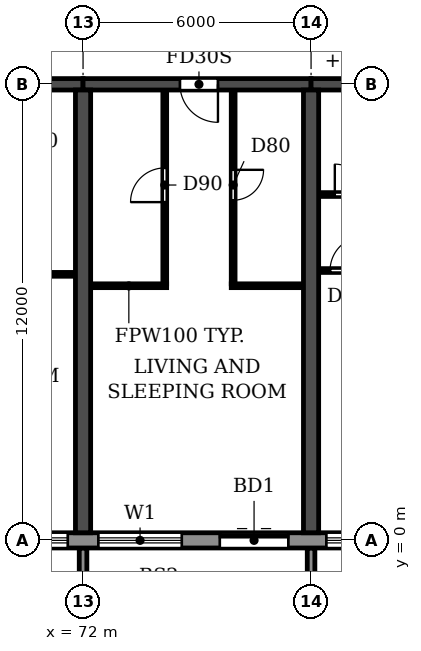
"""IFC4 building model, lengths in metres.
Left out: names, types, materials, properties, quantities, classifications, styles, units other than length and angle.
Written with IfcOpenShell. Run it as: python <this file> out.ifc"""

import sys

from ifc_helpers import new_model, si_unit, direction, frame, frame_2d, origin, place, context, subcontext, project, spatial, polyline, rectangle, outline, extrude, source, transform, mapped, element, fill, save


model = new_model("IFC4")
c1 = context("Model", 3, precision=1e-05, world=origin(), true_north=direction((0.0, 1.0)))
c2 = subcontext(c1, "Body", "Model", "MODEL_VIEW")
j1 = project(units=[si_unit("LENGTHUNIT", "METRE"), si_unit("PLANEANGLEUNIT", "RADIAN")], contexts=[c1])
p1 = place(None, origin())
s1 = spatial("IfcSite", under=j1, at=p1, CompositionType="ELEMENT")
p2 = place(p1, origin())
s2 = spatial("IfcBuilding", under=s1, at=p2, CompositionType="ELEMENT")
p3 = place(p2, frame((0.0, 0.0, 26.7)))
s3 = spatial("IfcBuildingStorey", under=s2, at=p3, CompositionType="ELEMENT", Elevation=26.7)
for number, where, z_axis, x_axis in (
    (1, (72.0, 0.2, 0.0), (0.0, 0.0, 1.0), (0.0, 1.0, 0.0)),
    (2, (78.0, 0.2, 0.0), (0.0, 0.0, 1.0), (0.0, 1.0, 0.0)),
):
    element("IfcWall", number, at=place(p3, frame(where, z_axis=z_axis, x_axis=x_axis)), inside=s3, PredefinedType="SHEAR", context=c2, shape_type="SweptSolid", body=[
        extrude(rectangle(XDim=11.65, YDim=0.4, at=frame_2d((5.825, 0.0))), origin(), (0.0, 0.0, 1.0), 3.05),
    ])
p4 = place(p3, frame((66.0, 12.0, 0.0), z_axis=(0.0, 0.0, 1.0), x_axis=(1.0, 0.0, 0.0)))
e3 = element("IfcWall", 3, at=p4, inside=s3, PredefinedType="SHEAR", context=c2, shape_type="SweptSolid", body=[
    extrude(rectangle(XDim=6.0, YDim=0.3, at=frame_2d((3.0, 0.0))), origin(), (0.0, 0.0, 1.0), 2.45),
])
p5 = place(p4, frame((2.45, 0.0, 0.0)))
e4 = element("IfcOpeningElement", 4, at=p5, cuts=e3, PredefinedType="OPENING", context=c2, shape_type="SweptSolid", body=[
    extrude(rectangle(XDim=1.0, YDim=2.1, at=frame_2d((0.5, 1.05))), frame((0.0, 0.16, 0.0), z_axis=(0.0, -1.0, 0.0), x_axis=(1.0, 0.0, 0.0)), (0.0, 0.0, 1.0), 0.32),
])
p6 = place(p3, frame((72.0, 12.0, 0.0), z_axis=(0.0, 0.0, 1.0), x_axis=(1.0, 0.0, 0.0)))
e5 = element("IfcWall", 5, at=p6, inside=s3, PredefinedType="SHEAR", context=c2, shape_type="SweptSolid", body=[
    extrude(rectangle(XDim=6.0, YDim=0.3, at=frame_2d((3.0, 0.0))), origin(), (0.0, 0.0, 1.0), 2.45),
])
p7 = place(p6, frame((2.55, 0.0, 0.0)))
e6 = element("IfcOpeningElement", 6, at=p7, cuts=e5, PredefinedType="OPENING", context=c2, shape_type="SweptSolid", body=[
    extrude(rectangle(XDim=1.0, YDim=2.1, at=frame_2d((0.5, 1.05))), frame((0.0, 0.16, 0.0), z_axis=(0.0, -1.0, 0.0), x_axis=(1.0, 0.0, 0.0)), (0.0, 0.0, 1.0), 0.32),
])
p8 = place(p3, frame((78.0, 12.0, 0.0), z_axis=(0.0, 0.0, 1.0), x_axis=(1.0, 0.0, 0.0)))
e7 = element("IfcWall", 7, at=p8, inside=s3, PredefinedType="SHEAR", context=c2, shape_type="SweptSolid", body=[
    extrude(rectangle(XDim=6.0, YDim=0.3, at=frame_2d((3.0, 0.0))), origin(), (0.0, 0.0, 1.0), 2.45),
])
p9 = place(p8, frame((2.45, 0.0, 0.0)))
e8 = element("IfcOpeningElement", 8, at=p9, cuts=e7, PredefinedType="OPENING", context=c2, shape_type="SweptSolid", body=[
    extrude(rectangle(XDim=1.0, YDim=2.1, at=frame_2d((0.5, 1.05))), frame((0.0, 0.16, 0.0), z_axis=(0.0, -1.0, 0.0), x_axis=(1.0, 0.0, 0.0)), (0.0, 0.0, 1.0), 0.32),
])
p10 = place(p3, frame((4.683, 0.0, 0.0), z_axis=(0.0, 0.0, 1.0), x_axis=(1.0, 0.0, 0.0)))
e9 = element("IfcWall", 9, at=p10, inside=s3, PredefinedType="STANDARD", context=c2, shape_type="SweptSolid", body=[
    extrude(rectangle(XDim=92.634, YDim=0.4, at=frame_2d((46.317, 0.0))), origin(), (0.0, 0.0, 1.0), 3.05),
])
p11 = place(p10, frame((1.717, 0.0, 0.9)))
e10 = element("IfcOpeningElement", 10, at=p11, cuts=e9, PredefinedType="OPENING", context=c2, shape_type="SweptSolid", body=[
    extrude(rectangle(XDim=2.2, YDim=1.5, at=frame_2d((1.1, 0.75))), frame((0.0, 0.21, 0.0), z_axis=(0.0, -1.0, 0.0), x_axis=(1.0, 0.0, 0.0)), (0.0, 0.0, 1.0), 0.42),
])
p12 = place(p10, frame((4.717, 0.0, 0.9)))
e11 = element("IfcOpeningElement", 11, at=p12, cuts=e9, PredefinedType="OPENING", context=c2, shape_type="SweptSolid", body=[
    extrude(rectangle(XDim=2.2, YDim=1.5, at=frame_2d((1.1, 0.75))), frame((0.0, 0.21, 0.0), z_axis=(0.0, -1.0, 0.0), x_axis=(1.0, 0.0, 0.0)), (0.0, 0.0, 1.0), 0.42),
])
p13 = place(p10, frame((7.717, 0.0, 0.9)))
e12 = element("IfcOpeningElement", 12, at=p13, cuts=e9, PredefinedType="OPENING", context=c2, shape_type="SweptSolid", body=[
    extrude(rectangle(XDim=2.2, YDim=1.5, at=frame_2d((1.1, 0.75))), frame((0.0, 0.21, 0.0), z_axis=(0.0, -1.0, 0.0), x_axis=(1.0, 0.0, 0.0)), (0.0, 0.0, 1.0), 0.42),
])
p14 = place(p10, frame((10.717, 0.0, 0.9)))
e13 = element("IfcOpeningElement", 13, at=p14, cuts=e9, PredefinedType="OPENING", context=c2, shape_type="SweptSolid", body=[
    extrude(rectangle(XDim=2.2, YDim=1.5, at=frame_2d((1.1, 0.75))), frame((0.0, 0.21, 0.0), z_axis=(0.0, -1.0, 0.0), x_axis=(1.0, 0.0, 0.0)), (0.0, 0.0, 1.0), 0.42),
])
p15 = place(p10, frame((13.717, 0.0, 0.9)))
e14 = element("IfcOpeningElement", 14, at=p15, cuts=e9, PredefinedType="OPENING", context=c2, shape_type="SweptSolid", body=[
    extrude(rectangle(XDim=2.2, YDim=1.5, at=frame_2d((1.1, 0.75))), frame((0.0, 0.21, 0.0), z_axis=(0.0, -1.0, 0.0), x_axis=(1.0, 0.0, 0.0)), (0.0, 0.0, 1.0), 0.42),
])
p16 = place(p10, frame((16.717, 0.0, 0.9)))
e15 = element("IfcOpeningElement", 15, at=p16, cuts=e9, PredefinedType="OPENING", context=c2, shape_type="SweptSolid", body=[
    extrude(rectangle(XDim=2.2, YDim=1.5, at=frame_2d((1.1, 0.75))), frame((0.0, 0.21, 0.0), z_axis=(0.0, -1.0, 0.0), x_axis=(1.0, 0.0, 0.0)), (0.0, 0.0, 1.0), 0.42),
])
p17 = place(p10, frame((19.917, 0.0, 0.0)))
e16 = element("IfcOpeningElement", 16, at=p17, cuts=e9, PredefinedType="OPENING", context=c2, shape_type="SweptSolid", body=[
    extrude(rectangle(XDim=1.8, YDim=2.4, at=frame_2d((0.9, 1.2))), frame((0.0, 0.21, 0.0), z_axis=(0.0, -1.0, 0.0), x_axis=(1.0, 0.0, 0.0)), (0.0, 0.0, 1.0), 0.42),
])
p18 = place(p10, frame((22.717, 0.0, 0.9)))
e17 = element("IfcOpeningElement", 17, at=p18, cuts=e9, PredefinedType="OPENING", context=c2, shape_type="SweptSolid", body=[
    extrude(rectangle(XDim=2.2, YDim=1.5, at=frame_2d((1.1, 0.75))), frame((0.0, 0.21, 0.0), z_axis=(0.0, -1.0, 0.0), x_axis=(1.0, 0.0, 0.0)), (0.0, 0.0, 1.0), 0.42),
])
p19 = place(p10, frame((25.717, 0.0, 0.9)))
e18 = element("IfcOpeningElement", 18, at=p19, cuts=e9, PredefinedType="OPENING", context=c2, shape_type="SweptSolid", body=[
    extrude(rectangle(XDim=2.2, YDim=1.5, at=frame_2d((1.1, 0.75))), frame((0.0, 0.21, 0.0), z_axis=(0.0, -1.0, 0.0), x_axis=(1.0, 0.0, 0.0)), (0.0, 0.0, 1.0), 0.42),
])
p20 = place(p10, frame((28.717, 0.0, 0.9)))
e19 = element("IfcOpeningElement", 19, at=p20, cuts=e9, PredefinedType="OPENING", context=c2, shape_type="SweptSolid", body=[
    extrude(rectangle(XDim=2.2, YDim=1.5, at=frame_2d((1.1, 0.75))), frame((0.0, 0.21, 0.0), z_axis=(0.0, -1.0, 0.0), x_axis=(1.0, 0.0, 0.0)), (0.0, 0.0, 1.0), 0.42),
])
p21 = place(p10, frame((31.917, 0.0, 0.0)))
e20 = element("IfcOpeningElement", 20, at=p21, cuts=e9, PredefinedType="OPENING", context=c2, shape_type="SweptSolid", body=[
    extrude(rectangle(XDim=1.8, YDim=2.4, at=frame_2d((0.9, 1.2))), frame((0.0, 0.21, 0.0), z_axis=(0.0, -1.0, 0.0), x_axis=(1.0, 0.0, 0.0)), (0.0, 0.0, 1.0), 0.42),
])
p22 = place(p10, frame((34.717, 0.0, 0.9)))
e21 = element("IfcOpeningElement", 21, at=p22, cuts=e9, PredefinedType="OPENING", context=c2, shape_type="SweptSolid", body=[
    extrude(rectangle(XDim=2.2, YDim=1.5, at=frame_2d((1.1, 0.75))), frame((0.0, 0.21, 0.0), z_axis=(0.0, -1.0, 0.0), x_axis=(1.0, 0.0, 0.0)), (0.0, 0.0, 1.0), 0.42),
])
p23 = place(p10, frame((37.717, 0.0, 0.9)))
e22 = element("IfcOpeningElement", 22, at=p23, cuts=e9, PredefinedType="OPENING", context=c2, shape_type="SweptSolid", body=[
    extrude(rectangle(XDim=2.2, YDim=1.5, at=frame_2d((1.1, 0.75))), frame((0.0, 0.21, 0.0), z_axis=(0.0, -1.0, 0.0), x_axis=(1.0, 0.0, 0.0)), (0.0, 0.0, 1.0), 0.42),
])
p24 = place(p10, frame((40.717, 0.0, 0.9)))
e23 = element("IfcOpeningElement", 23, at=p24, cuts=e9, PredefinedType="OPENING", context=c2, shape_type="SweptSolid", body=[
    extrude(rectangle(XDim=2.2, YDim=1.5, at=frame_2d((1.1, 0.75))), frame((0.0, 0.21, 0.0), z_axis=(0.0, -1.0, 0.0), x_axis=(1.0, 0.0, 0.0)), (0.0, 0.0, 1.0), 0.42),
])
p25 = place(p10, frame((43.917, 0.0, 0.0)))
e24 = element("IfcOpeningElement", 24, at=p25, cuts=e9, PredefinedType="OPENING", context=c2, shape_type="SweptSolid", body=[
    extrude(rectangle(XDim=1.8, YDim=2.4, at=frame_2d((0.9, 1.2))), frame((0.0, 0.21, 0.0), z_axis=(0.0, -1.0, 0.0), x_axis=(1.0, 0.0, 0.0)), (0.0, 0.0, 1.0), 0.42),
])
p26 = place(p10, frame((46.717, 0.0, 0.9)))
e25 = element("IfcOpeningElement", 25, at=p26, cuts=e9, PredefinedType="OPENING", context=c2, shape_type="SweptSolid", body=[
    extrude(rectangle(XDim=2.2, YDim=1.5, at=frame_2d((1.1, 0.75))), frame((0.0, 0.21, 0.0), z_axis=(0.0, -1.0, 0.0), x_axis=(1.0, 0.0, 0.0)), (0.0, 0.0, 1.0), 0.42),
])
p27 = place(p10, frame((49.717, 0.0, 0.9)))
e26 = element("IfcOpeningElement", 26, at=p27, cuts=e9, PredefinedType="OPENING", context=c2, shape_type="SweptSolid", body=[
    extrude(rectangle(XDim=2.2, YDim=1.5, at=frame_2d((1.1, 0.75))), frame((0.0, 0.21, 0.0), z_axis=(0.0, -1.0, 0.0), x_axis=(1.0, 0.0, 0.0)), (0.0, 0.0, 1.0), 0.42),
])
p28 = place(p10, frame((52.717, 0.0, 0.9)))
e27 = element("IfcOpeningElement", 27, at=p28, cuts=e9, PredefinedType="OPENING", context=c2, shape_type="SweptSolid", body=[
    extrude(rectangle(XDim=2.2, YDim=1.5, at=frame_2d((1.1, 0.75))), frame((0.0, 0.21, 0.0), z_axis=(0.0, -1.0, 0.0), x_axis=(1.0, 0.0, 0.0)), (0.0, 0.0, 1.0), 0.42),
])
p29 = place(p10, frame((55.717, 0.0, 0.9)))
e28 = element("IfcOpeningElement", 28, at=p29, cuts=e9, PredefinedType="OPENING", context=c2, shape_type="SweptSolid", body=[
    extrude(rectangle(XDim=2.2, YDim=1.5, at=frame_2d((1.1, 0.75))), frame((0.0, 0.21, 0.0), z_axis=(0.0, -1.0, 0.0), x_axis=(1.0, 0.0, 0.0)), (0.0, 0.0, 1.0), 0.42),
])
p30 = place(p10, frame((58.917, 0.0, 0.0)))
e29 = element("IfcOpeningElement", 29, at=p30, cuts=e9, PredefinedType="OPENING", context=c2, shape_type="SweptSolid", body=[
    extrude(rectangle(XDim=1.8, YDim=2.4, at=frame_2d((0.9, 1.2))), frame((0.0, 0.21, 0.0), z_axis=(0.0, -1.0, 0.0), x_axis=(1.0, 0.0, 0.0)), (0.0, 0.0, 1.0), 0.42),
])
p31 = place(p10, frame((61.717, 0.0, 0.9)))
e30 = element("IfcOpeningElement", 30, at=p31, cuts=e9, PredefinedType="OPENING", context=c2, shape_type="SweptSolid", body=[
    extrude(rectangle(XDim=2.2, YDim=1.5, at=frame_2d((1.1, 0.75))), frame((0.0, 0.21, 0.0), z_axis=(0.0, -1.0, 0.0), x_axis=(1.0, 0.0, 0.0)), (0.0, 0.0, 1.0), 0.42),
])
p32 = place(p10, frame((64.717, 0.0, 0.9)))
e31 = element("IfcOpeningElement", 31, at=p32, cuts=e9, PredefinedType="OPENING", context=c2, shape_type="SweptSolid", body=[
    extrude(rectangle(XDim=2.2, YDim=1.5, at=frame_2d((1.1, 0.75))), frame((0.0, 0.21, 0.0), z_axis=(0.0, -1.0, 0.0), x_axis=(1.0, 0.0, 0.0)), (0.0, 0.0, 1.0), 0.42),
])
p33 = place(p10, frame((67.717, 0.0, 0.9)))
e32 = element("IfcOpeningElement", 32, at=p33, cuts=e9, PredefinedType="OPENING", context=c2, shape_type="SweptSolid", body=[
    extrude(rectangle(XDim=2.2, YDim=1.5, at=frame_2d((1.1, 0.75))), frame((0.0, 0.21, 0.0), z_axis=(0.0, -1.0, 0.0), x_axis=(1.0, 0.0, 0.0)), (0.0, 0.0, 1.0), 0.42),
])
p34 = place(p10, frame((70.917, 0.0, 0.0)))
e33 = element("IfcOpeningElement", 33, at=p34, cuts=e9, PredefinedType="OPENING", context=c2, shape_type="SweptSolid", body=[
    extrude(rectangle(XDim=1.8, YDim=2.4, at=frame_2d((0.9, 1.2))), frame((0.0, 0.21, 0.0), z_axis=(0.0, -1.0, 0.0), x_axis=(1.0, 0.0, 0.0)), (0.0, 0.0, 1.0), 0.42),
])
p35 = place(p10, frame((73.717, 0.0, 0.9)))
e34 = element("IfcOpeningElement", 34, at=p35, cuts=e9, PredefinedType="OPENING", context=c2, shape_type="SweptSolid", body=[
    extrude(rectangle(XDim=2.2, YDim=1.5, at=frame_2d((1.1, 0.75))), frame((0.0, 0.21, 0.0), z_axis=(0.0, -1.0, 0.0), x_axis=(1.0, 0.0, 0.0)), (0.0, 0.0, 1.0), 0.42),
])
p36 = place(p10, frame((76.717, 0.0, 0.9)))
e35 = element("IfcOpeningElement", 35, at=p36, cuts=e9, PredefinedType="OPENING", context=c2, shape_type="SweptSolid", body=[
    extrude(rectangle(XDim=2.2, YDim=1.5, at=frame_2d((1.1, 0.75))), frame((0.0, 0.21, 0.0), z_axis=(0.0, -1.0, 0.0), x_axis=(1.0, 0.0, 0.0)), (0.0, 0.0, 1.0), 0.42),
])
p37 = place(p10, frame((79.717, 0.0, 0.9)))
e36 = element("IfcOpeningElement", 36, at=p37, cuts=e9, PredefinedType="OPENING", context=c2, shape_type="SweptSolid", body=[
    extrude(rectangle(XDim=2.2, YDim=1.5, at=frame_2d((1.1, 0.75))), frame((0.0, 0.21, 0.0), z_axis=(0.0, -1.0, 0.0), x_axis=(1.0, 0.0, 0.0)), (0.0, 0.0, 1.0), 0.42),
])
p38 = place(p10, frame((82.717, 0.0, 0.9)))
e37 = element("IfcOpeningElement", 37, at=p38, cuts=e9, PredefinedType="OPENING", context=c2, shape_type="SweptSolid", body=[
    extrude(rectangle(XDim=2.2, YDim=1.5, at=frame_2d((1.1, 0.75))), frame((0.0, 0.21, 0.0), z_axis=(0.0, -1.0, 0.0), x_axis=(1.0, 0.0, 0.0)), (0.0, 0.0, 1.0), 0.42),
])
p39 = place(p10, frame((85.717, 0.0, 0.9)))
e38 = element("IfcOpeningElement", 38, at=p39, cuts=e9, PredefinedType="OPENING", context=c2, shape_type="SweptSolid", body=[
    extrude(rectangle(XDim=2.2, YDim=1.5, at=frame_2d((1.1, 0.75))), frame((0.0, 0.21, 0.0), z_axis=(0.0, -1.0, 0.0), x_axis=(1.0, 0.0, 0.0)), (0.0, 0.0, 1.0), 0.42),
])
p40 = place(p10, frame((88.717, 0.0, 0.9)))
e39 = element("IfcOpeningElement", 39, at=p40, cuts=e9, PredefinedType="OPENING", context=c2, shape_type="SweptSolid", body=[
    extrude(rectangle(XDim=2.2, YDim=1.5, at=frame_2d((1.1, 0.75))), frame((0.0, 0.21, 0.0), z_axis=(0.0, -1.0, 0.0), x_axis=(1.0, 0.0, 0.0)), (0.0, 0.0, 1.0), 0.42),
])
m1 = source(origin(), c2, "Body", "SweptSolid", [
    extrude(outline(polyline([(0.0, 0.0), (0.2, 0.0), (0.2, 1.65), (0.0, 1.65), (0.0, 0.0)])), origin(), (0.0, 0.0, 1.0), 3.1),
])
for number, where in (
    (40, (71.9, -1.85, 0.0)),
    (41, (77.9, -1.85, 0.0)),
):
    element("IfcWall", number, at=place(p3, frame(where)), inside=s3, PredefinedType="STANDARD", context=c2, shape_type="MappedRepresentation", body=[
        mapped(m1, transform((0.0, 0.0, 0.0))),
    ])
p41 = place(p3, frame((72.21, 6.7, 0.0), z_axis=(0.0, 0.0, 1.0), x_axis=(1.0, 0.0, 0.0)))
e42 = element("IfcWall", 42, at=p41, inside=s3, PredefinedType="PARTITIONING", context=c2, shape_type="SweptSolid", body=[
    extrude(rectangle(XDim=1.99, YDim=0.1, at=frame_2d((0.995, 0.0))), origin(), (0.0, 0.0, 1.0), 3.05),
])
p42 = place(p3, frame((75.9, 6.7, 0.0), z_axis=(0.0, 0.0, 1.0), x_axis=(1.0, 0.0, 0.0)))
e43 = element("IfcWall", 43, at=p42, inside=s3, PredefinedType="PARTITIONING", context=c2, shape_type="SweptSolid", body=[
    extrude(rectangle(XDim=1.89, YDim=0.1, at=frame_2d((0.945, 0.0))), origin(), (0.0, 0.0, 1.0), 3.05),
])
p43 = place(p3, frame((69.8, 7.0, 0.0), z_axis=(0.0, 0.0, 1.0), x_axis=(1.0, 0.0, 0.0)))
e44 = element("IfcWall", 44, at=p43, inside=s3, PredefinedType="PARTITIONING", context=c2, shape_type="SweptSolid", body=[
    extrude(rectangle(XDim=1.99, YDim=0.1, at=frame_2d((0.995, 0.0))), origin(), (0.0, 0.0, 1.0), 3.05),
])
p44 = place(p3, frame((78.21, 7.1, 0.0), z_axis=(0.0, 0.0, 1.0), x_axis=(1.0, 0.0, 0.0)))
e45 = element("IfcWall", 45, at=p44, inside=s3, PredefinedType="PARTITIONING", context=c2, shape_type="SweptSolid", body=[
    extrude(rectangle(XDim=2.84, YDim=0.1, at=frame_2d((1.42, 0.0))), origin(), (0.0, 0.0, 1.0), 3.05),
])
p45 = place(p44, frame((0.29, 0.0, 0.0)))
e46 = element("IfcOpeningElement", 46, at=p45, cuts=e45, PredefinedType="OPENING", context=c2, shape_type="SweptSolid", body=[
    extrude(rectangle(XDim=0.9, YDim=2.1, at=frame_2d((0.45, 1.05))), frame((0.0, 0.06, 0.0), z_axis=(0.0, -1.0, 0.0), x_axis=(1.0, 0.0, 0.0)), (0.0, 0.0, 1.0), 0.12),
])
p46 = place(p3, frame((78.21, 9.1, 0.0), z_axis=(0.0, 0.0, 1.0), x_axis=(1.0, 0.0, 0.0)))
e47 = element("IfcWall", 47, at=p46, inside=s3, PredefinedType="PARTITIONING", context=c2, shape_type="SweptSolid", body=[
    extrude(rectangle(XDim=1.89, YDim=0.1, at=frame_2d((0.945, 0.0))), origin(), (0.0, 0.0, 1.0), 3.05),
])
p47 = place(p46, frame((0.415, 0.0, 0.0)))
e48 = element("IfcOpeningElement", 48, at=p47, cuts=e47, PredefinedType="OPENING", context=c2, shape_type="SweptSolid", body=[
    extrude(rectangle(XDim=0.8, YDim=2.1, at=frame_2d((0.4, 1.05))), frame((0.0, 0.06, 0.0), z_axis=(0.0, -1.0, 0.0), x_axis=(1.0, 0.0, 0.0)), (0.0, 0.0, 1.0), 0.12),
])
p48 = place(p3, frame((74.15, 6.75, 0.0), z_axis=(0.0, 0.0, 1.0), x_axis=(0.0, 1.0, 0.0)))
e49 = element("IfcWall", 49, at=p48, inside=s3, PredefinedType="PARTITIONING", context=c2, shape_type="SweptSolid", body=[
    extrude(rectangle(XDim=5.09, YDim=0.1, at=frame_2d((2.545, 0.0))), origin(), (0.0, 0.0, 1.0), 3.05),
])
p49 = place(p48, frame((2.15, 0.0, 0.0)))
e50 = element("IfcOpeningElement", 50, at=p49, cuts=e49, PredefinedType="OPENING", context=c2, shape_type="SweptSolid", body=[
    extrude(rectangle(XDim=0.9, YDim=2.1, at=frame_2d((0.45, 1.05))), frame((0.0, 0.06, 0.0), z_axis=(0.0, -1.0, 0.0), x_axis=(1.0, 0.0, 0.0)), (0.0, 0.0, 1.0), 0.12),
])
p50 = place(p3, frame((75.95, 6.75, 0.0), z_axis=(0.0, 0.0, 1.0), x_axis=(0.0, 1.0, 0.0)))
e51 = element("IfcWall", 51, at=p50, inside=s3, PredefinedType="PARTITIONING", context=c2, shape_type="SweptSolid", body=[
    extrude(rectangle(XDim=5.09, YDim=0.1, at=frame_2d((2.545, 0.0))), origin(), (0.0, 0.0, 1.0), 3.05),
])
p51 = place(p50, frame((2.2, 0.0, 0.0)))
e52 = element("IfcOpeningElement", 52, at=p51, cuts=e51, PredefinedType="OPENING", context=c2, shape_type="SweptSolid", body=[
    extrude(rectangle(XDim=0.8, YDim=2.1, at=frame_2d((0.4, 1.05))), frame((0.0, 0.06, 0.0), z_axis=(0.0, -1.0, 0.0), x_axis=(1.0, 0.0, 0.0)), (0.0, 0.0, 1.0), 0.12),
])
p52 = place(p32, origin())
e53 = element("IfcWindow", 53, at=p52, inside=s3, PartitioningType="DOUBLE_PANEL_HORIZONTAL", PredefinedType="WINDOW", context=c2, shape_type="SweptSolid", body=[
    extrude(rectangle(XDim=2.2, YDim=1.5, at=frame_2d((1.1, 0.75))), frame((0.0, 0.03, 0.0), z_axis=(0.0, -1.0, 0.0), x_axis=(1.0, 0.0, 0.0)), (0.0, 0.0, 1.0), 0.06),
])
fill(e31, e53)
p53 = place(p33, origin())
e54 = element("IfcWindow", 54, at=p53, inside=s3, PartitioningType="DOUBLE_PANEL_HORIZONTAL", PredefinedType="WINDOW", context=c2, shape_type="SweptSolid", body=[
    extrude(rectangle(XDim=2.2, YDim=1.5, at=frame_2d((1.1, 0.75))), frame((0.0, 0.03, 0.0), z_axis=(0.0, -1.0, 0.0), x_axis=(1.0, 0.0, 0.0)), (0.0, 0.0, 1.0), 0.06),
])
fill(e32, e54)
p54 = place(p34, origin())
e55 = element("IfcDoor", 55, at=p54, inside=s3, OperationType="DOUBLE_DOOR_SLIDING", PredefinedType="DOOR", context=c2, shape_type="SweptSolid", body=[
    extrude(rectangle(XDim=1.8, YDim=2.4, at=frame_2d((0.9, 1.2))), frame((0.0, 0.025, 0.0), z_axis=(0.0, -1.0, 0.0), x_axis=(1.0, 0.0, 0.0)), (0.0, 0.0, 1.0), 0.05),
])
fill(e33, e55)
p55 = place(p35, origin())
e56 = element("IfcWindow", 56, at=p55, inside=s3, PartitioningType="DOUBLE_PANEL_HORIZONTAL", PredefinedType="WINDOW", context=c2, shape_type="SweptSolid", body=[
    extrude(rectangle(XDim=2.2, YDim=1.5, at=frame_2d((1.1, 0.75))), frame((0.0, 0.03, 0.0), z_axis=(0.0, -1.0, 0.0), x_axis=(1.0, 0.0, 0.0)), (0.0, 0.0, 1.0), 0.06),
])
fill(e34, e56)
p56 = place(p49, origin())
e57 = element("IfcDoor", 57, at=p56, inside=s3, OperationType="SINGLE_SWING_LEFT", PredefinedType="DOOR", context=c2, shape_type="SweptSolid", body=[
    extrude(rectangle(XDim=0.9, YDim=2.1, at=frame_2d((0.45, 1.05))), frame((0.0, 0.025, 0.0), z_axis=(0.0, -1.0, 0.0), x_axis=(1.0, 0.0, 0.0)), (0.0, 0.0, 1.0), 0.05),
])
fill(e50, e57)
p57 = place(p7, frame((1.0, 0.0, 0.0), z_axis=(0.0, 0.0, 1.0), x_axis=(-1.0, 0.0, 0.0)))
e58 = element("IfcDoor", 58, at=p57, inside=s3, OperationType="SINGLE_SWING_LEFT", PredefinedType="DOOR", context=c2, shape_type="SweptSolid", body=[
    extrude(rectangle(XDim=1.0, YDim=2.1, at=frame_2d((0.5, 1.05))), frame((0.0, 0.025, 0.0), z_axis=(0.0, -1.0, 0.0), x_axis=(1.0, 0.0, 0.0)), (0.0, 0.0, 1.0), 0.05),
])
fill(e6, e58)
p58 = place(p51, frame((0.8, 0.0, 0.0), z_axis=(0.0, 0.0, 1.0), x_axis=(-1.0, 0.0, 0.0)))
e59 = element("IfcDoor", 59, at=p58, inside=s3, OperationType="SINGLE_SWING_LEFT", PredefinedType="DOOR", context=c2, shape_type="SweptSolid", body=[
    extrude(rectangle(XDim=0.8, YDim=2.1, at=frame_2d((0.4, 1.05))), frame((0.0, 0.025, 0.0), z_axis=(0.0, -1.0, 0.0), x_axis=(1.0, 0.0, 0.0)), (0.0, 0.0, 1.0), 0.05),
])
fill(e52, e59)
p59 = place(p45, origin())
e60 = element("IfcDoor", 60, at=p59, inside=s3, OperationType="SINGLE_SWING_RIGHT", PredefinedType="DOOR", context=c2, shape_type="SweptSolid", body=[
    extrude(rectangle(XDim=0.9, YDim=2.1, at=frame_2d((0.45, 1.05))), frame((0.0, 0.025, 0.0), z_axis=(0.0, -1.0, 0.0), x_axis=(1.0, 0.0, 0.0)), (0.0, 0.0, 1.0), 0.05),
])
fill(e46, e60)
p60 = place(p47, origin())
e61 = element("IfcDoor", 61, at=p60, inside=s3, OperationType="SINGLE_SWING_LEFT", PredefinedType="DOOR", context=c2, shape_type="SweptSolid", body=[
    extrude(rectangle(XDim=0.8, YDim=2.1, at=frame_2d((0.4, 1.05))), frame((0.0, 0.025, 0.0), z_axis=(0.0, -1.0, 0.0), x_axis=(1.0, 0.0, 0.0)), (0.0, 0.0, 1.0), 0.05),
])
fill(e48, e61)
save(model, sys.argv[1])
